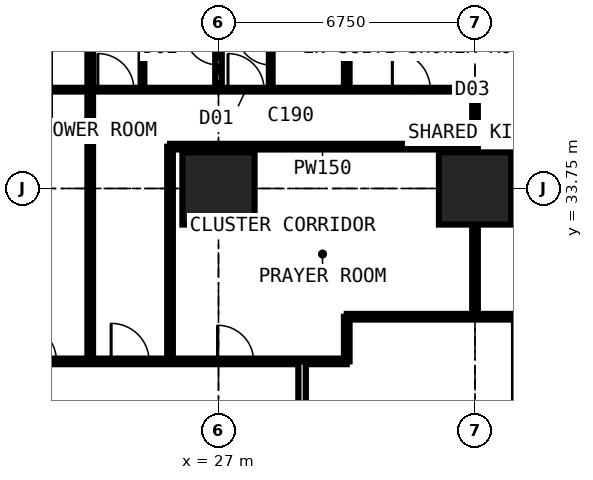
"""IFC4 building model, lengths in metres.
Left out: names, types, materials, properties, quantities, classifications, styles, units other than length and angle.
Written with IfcOpenShell. Run it as: python <this file> out.ifc"""

import sys

from ifc_helpers import new_model, si_unit, direction, frame, frame_2d, origin, origin_2d, place, context, subcontext, project, spatial, rectangle, extrude, element, fill, save


model = new_model("IFC4")
c1 = context("Model", 3, precision=1e-05, world=origin(), true_north=direction((0.0, 1.0)))
c2 = subcontext(c1, "Body", "Model", "MODEL_VIEW")
j1 = project(units=[si_unit("LENGTHUNIT", "METRE"), si_unit("PLANEANGLEUNIT", "RADIAN")], contexts=[c1])
p1 = place(None, origin())
s1 = spatial("IfcSite", under=j1, at=p1, CompositionType="ELEMENT")
p2 = place(p1, origin())
s2 = spatial("IfcBuilding", under=s1, at=p2, CompositionType="ELEMENT")
p3 = place(p2, frame((0.0, 0.0, 25.2)))
s3 = spatial("IfcBuildingStorey", under=s2, at=p3, CompositionType="ELEMENT", Elevation=25.2)
for number, where, z_axis, x_axis in (
    (1, (27.0, 33.75, 0.0), (0.0, 0.0, 1.0), (1.0, 0.0, 0.0)),
    (2, (33.75, 33.75, 0.0), (0.0, 0.0, 1.0), (1.0, 0.0, 0.0)),
):
    element("IfcColumn", number, at=place(p3, frame(where, z_axis=z_axis, x_axis=x_axis)), inside=s3, PredefinedType="COLUMN", context=c2, shape_type="SweptSolid", body=[
        extrude(rectangle(XDim=1.9, YDim=1.9, at=origin_2d()), origin(), (0.0, 0.0, 1.0), 3.6),
    ])
p4 = place(p3, frame((10.125, 36.35, 0.0), z_axis=(0.0, 0.0, 1.0), x_axis=(1.0, 0.0, 0.0)))
e3 = element("IfcWall", 3, at=p4, inside=s3, PredefinedType="PARTITIONING", context=c2, shape_type="SweptSolid", body=[
    extrude(rectangle(XDim=23.625, YDim=0.1, at=frame_2d((11.812, 0.0))), origin(), (0.0, 0.0, 1.0), 3.375),
])
p5 = place(p4, frame((21.45, 0.0, 0.0)))
e4 = element("IfcOpeningElement", 4, at=p5, cuts=e3, PredefinedType="OPENING", context=c2, shape_type="SweptSolid", body=[
    extrude(rectangle(XDim=1.0, YDim=2.2, at=frame_2d((0.5, 1.1))), frame((0.0, 0.06, 0.0), z_axis=(0.0, -1.0, 0.0), x_axis=(1.0, 0.0, 0.0)), (0.0, 0.0, 1.0), 0.12),
])
p6 = place(p4, frame((17.125, 0.0, 0.0)))
e5 = element("IfcOpeningElement", 5, at=p6, cuts=e3, PredefinedType="OPENING", context=c2, shape_type="SweptSolid", body=[
    extrude(rectangle(XDim=0.95, YDim=2.2, at=frame_2d((0.475, 1.1))), frame((0.0, 0.06, 0.0), z_axis=(0.0, -1.0, 0.0), x_axis=(1.0, 0.0, 0.0)), (0.0, 0.0, 1.0), 0.12),
])
p7 = place(p4, frame((13.7, 0.0, 0.0)))
e6 = element("IfcOpeningElement", 6, at=p7, cuts=e3, PredefinedType="OPENING", context=c2, shape_type="SweptSolid", body=[
    extrude(rectangle(XDim=0.95, YDim=2.2, at=frame_2d((0.475, 1.1))), frame((0.0, 0.06, 0.0), z_axis=(0.0, -1.0, 0.0), x_axis=(1.0, 0.0, 0.0)), (0.0, 0.0, 1.0), 0.12),
])
p8 = place(p4, frame((0.2, 0.0, 0.0)))
e7 = element("IfcOpeningElement", 7, at=p8, cuts=e3, PredefinedType="OPENING", context=c2, shape_type="SweptSolid", body=[
    extrude(rectangle(XDim=0.95, YDim=2.2, at=frame_2d((0.475, 1.1))), frame((0.0, 0.06, 0.0), z_axis=(0.0, -1.0, 0.0), x_axis=(1.0, 0.0, 0.0)), (0.0, 0.0, 1.0), 0.12),
])
p9 = place(p4, frame((3.625, 0.0, 0.0)))
e8 = element("IfcOpeningElement", 8, at=p9, cuts=e3, PredefinedType="OPENING", context=c2, shape_type="SweptSolid", body=[
    extrude(rectangle(XDim=0.95, YDim=2.2, at=frame_2d((0.475, 1.1))), frame((0.0, 0.06, 0.0), z_axis=(0.0, -1.0, 0.0), x_axis=(1.0, 0.0, 0.0)), (0.0, 0.0, 1.0), 0.12),
])
p10 = place(p4, frame((7.0, 0.0, 0.0)))
e9 = element("IfcOpeningElement", 9, at=p10, cuts=e3, PredefinedType="OPENING", context=c2, shape_type="SweptSolid", body=[
    extrude(rectangle(XDim=0.95, YDim=2.2, at=frame_2d((0.475, 1.1))), frame((0.0, 0.06, 0.0), z_axis=(0.0, -1.0, 0.0), x_axis=(1.0, 0.0, 0.0)), (0.0, 0.0, 1.0), 0.12),
])
p11 = place(p4, frame((10.375, 0.0, 0.0)))
e10 = element("IfcOpeningElement", 10, at=p11, cuts=e3, PredefinedType="OPENING", context=c2, shape_type="SweptSolid", body=[
    extrude(rectangle(XDim=0.95, YDim=2.2, at=frame_2d((0.475, 1.1))), frame((0.0, 0.06, 0.0), z_axis=(0.0, -1.0, 0.0), x_axis=(1.0, 0.0, 0.0)), (0.0, 0.0, 1.0), 0.12),
])
p12 = place(p3, frame((11.3, 29.2, 0.0), z_axis=(0.0, 0.0, 1.0), x_axis=(1.0, 0.0, 0.0)))
e11 = element("IfcWall", 11, at=p12, inside=s3, PredefinedType="PARTITIONING", context=c2, shape_type="SweptSolid", body=[
    extrude(rectangle(XDim=19.075, YDim=0.15, at=frame_2d((9.538, 0.0))), origin(), (0.0, 0.0, 1.0), 3.375),
])
p13 = place(p12, frame((12.875, 0.0, 0.0)))
e12 = element("IfcOpeningElement", 12, at=p13, cuts=e11, PredefinedType="OPENING", context=c2, shape_type="SweptSolid", body=[
    extrude(rectangle(XDim=1.0, YDim=2.2, at=frame_2d((0.5, 1.1))), frame((0.0, 0.085, 0.0), z_axis=(0.0, -1.0, 0.0), x_axis=(1.0, 0.0, 0.0)), (0.0, 0.0, 1.0), 0.17),
])
p14 = place(p12, frame((10.438, 0.0, 0.0)))
e13 = element("IfcOpeningElement", 13, at=p14, cuts=e11, PredefinedType="OPENING", context=c2, shape_type="SweptSolid", body=[
    extrude(rectangle(XDim=1.0, YDim=2.2, at=frame_2d((0.5, 1.1))), frame((0.0, 0.085, 0.0), z_axis=(0.0, -1.0, 0.0), x_axis=(1.0, 0.0, 0.0)), (0.0, 0.0, 1.0), 0.17),
])
p15 = place(p12, frame((15.675, 0.0, 0.0)))
e14 = element("IfcOpeningElement", 14, at=p15, cuts=e11, PredefinedType="OPENING", context=c2, shape_type="SweptSolid", body=[
    extrude(rectangle(XDim=0.95, YDim=2.2, at=frame_2d((0.475, 1.1))), frame((0.0, 0.085, 0.0), z_axis=(0.0, -1.0, 0.0), x_axis=(1.0, 0.0, 0.0)), (0.0, 0.0, 1.0), 0.17),
])
p16 = place(p3, frame((23.625, 29.2, 0.0), z_axis=(0.0, 0.0, 1.0), x_axis=(0.0, 1.0, 0.0)))
e15 = element("IfcWall", 15, at=p16, inside=s3, PredefinedType="PARTITIONING", context=c2, shape_type="SweptSolid", body=[
    extrude(rectangle(XDim=12.034, YDim=0.15, at=frame_2d((6.017, 0.0))), origin(), (0.0, 0.0, 1.0), 3.375),
])
p17 = place(p3, frame((25.0, 36.35, 0.0), z_axis=(0.0, 0.0, 1.0), x_axis=(0.0, 1.0, 0.0)))
e16 = element("IfcWall", 16, at=p17, inside=s3, PredefinedType="PARTITIONING", context=c2, shape_type="SweptSolid", body=[
    extrude(rectangle(XDim=2.2, YDim=0.1, at=frame_2d((1.1, 0.0))), origin(), (0.0, 0.0, 1.0), 3.375),
])
p18 = place(p3, frame((25.725, 29.2, 0.0), z_axis=(0.0, 0.0, 1.0), x_axis=(0.0, 1.0, 0.0)))
e17 = element("IfcWall", 17, at=p18, inside=s3, PredefinedType="PARTITIONING", context=c2, shape_type="SweptSolid", body=[
    extrude(rectangle(XDim=5.65, YDim=0.15, at=frame_2d((2.825, 0.0))), origin(), (0.0, 0.0, 1.0), 3.375),
])
p19 = place(p3, frame((25.725, 34.85, 0.0), z_axis=(0.0, 0.0, 1.0), x_axis=(1.0, 0.0, 0.0)))
e18 = element("IfcWall", 18, at=p19, inside=s3, PredefinedType="PARTITIONING", context=c2, shape_type="SweptSolid", body=[
    extrude(rectangle(XDim=8.025, YDim=0.15, at=frame_2d((4.012, 0.0))), origin(), (0.0, 0.0, 1.0), 3.375),
])
p20 = place(p3, frame((27.0, 36.35, 0.0), z_axis=(0.0, 0.0, 1.0), x_axis=(0.0, 1.0, 0.0)))
e19 = element("IfcWall", 19, at=p20, inside=s3, PredefinedType="PARTITIONING", context=c2, shape_type="SweptSolid", body=[
    extrude(rectangle(XDim=4.884, YDim=0.175, at=frame_2d((2.442, 0.0))), origin(), (0.0, 0.0, 1.0), 2.61),
])
p21 = place(p20, frame((0.65, 0.0, 0.0)))
e20 = element("IfcOpeningElement", 20, at=p21, cuts=e19, PredefinedType="OPENING", context=c2, shape_type="SweptSolid", body=[
    extrude(rectangle(XDim=0.9, YDim=2.2, at=frame_2d((0.45, 1.1))), frame((0.0, 0.097, 0.0), z_axis=(0.0, -1.0, 0.0), x_axis=(1.0, 0.0, 0.0)), (0.0, 0.0, 1.0), 0.195),
])
p22 = place(p3, frame((28.375, 36.35, 0.0), z_axis=(0.0, 0.0, 1.0), x_axis=(0.0, 1.0, 0.0)))
e21 = element("IfcWall", 21, at=p22, inside=s3, PredefinedType="PARTITIONING", context=c2, shape_type="SweptSolid", body=[
    extrude(rectangle(XDim=2.2, YDim=0.1, at=frame_2d((1.1, 0.0))), origin(), (0.0, 0.0, 1.0), 3.375),
])
p23 = place(p22, frame((0.65, 0.0, 0.0)))
e22 = element("IfcOpeningElement", 22, at=p23, cuts=e21, PredefinedType="OPENING", context=c2, shape_type="SweptSolid", body=[
    extrude(rectangle(XDim=0.9, YDim=2.2, at=frame_2d((0.45, 1.1))), frame((0.0, 0.06, 0.0), z_axis=(0.0, -1.0, 0.0), x_axis=(1.0, 0.0, 0.0)), (0.0, 0.0, 1.0), 0.12),
])
p24 = place(p3, frame((29.2, 11.3, 0.0), z_axis=(0.0, 0.0, 1.0), x_axis=(0.0, 1.0, 0.0)))
e23 = element("IfcWall", 23, at=p24, inside=s3, PredefinedType="PARTITIONING", context=c2, shape_type="SweptSolid", body=[
    extrude(rectangle(XDim=17.9, YDim=0.2, at=frame_2d((8.95, 0.0))), origin(), (0.0, 0.0, 1.0), 3.375),
])
p25 = place(p24, frame((8.35, 0.0, 0.0)))
e24 = element("IfcOpeningElement", 24, at=p25, cuts=e23, PredefinedType="OPENING", context=c2, shape_type="SweptSolid", body=[
    extrude(rectangle(XDim=1.2, YDim=2.2, at=frame_2d((0.6, 1.1))), frame((0.0, 0.11, 0.0), z_axis=(0.0, -1.0, 0.0), x_axis=(1.0, 0.0, 0.0)), (0.0, 0.0, 1.0), 0.22),
])
p26 = place(p3, frame((30.375, 29.2, 0.0), z_axis=(0.0, 0.0, 1.0), x_axis=(0.0, 1.0, 0.0)))
e25 = element("IfcWall", 25, at=p26, inside=s3, PredefinedType="PARTITIONING", context=c2, shape_type="SweptSolid", body=[
    extrude(rectangle(XDim=1.175, YDim=0.15, at=frame_2d((0.587, 0.0))), origin(), (0.0, 0.0, 1.0), 3.375),
])
p27 = place(p3, frame((30.375, 30.375, 0.0), z_axis=(0.0, 0.0, 1.0), x_axis=(1.0, 0.0, 0.0)))
e26 = element("IfcWall", 26, at=p27, inside=s3, PredefinedType="PARTITIONING", context=c2, shape_type="SweptSolid", body=[
    extrude(rectangle(XDim=10.859, YDim=0.15, at=frame_2d((5.429, 0.0))), origin(), (0.0, 0.0, 1.0), 3.375),
])
p28 = place(p3, frame((30.375, 36.35, 0.0), z_axis=(0.0, 0.0, 1.0), x_axis=(0.0, 1.0, 0.0)))
e27 = element("IfcWall", 27, at=p28, inside=s3, PredefinedType="PARTITIONING", context=c2, shape_type="SweptSolid", body=[
    extrude(rectangle(XDim=4.884, YDim=0.15, at=frame_2d((2.442, 0.0))), origin(), (0.0, 0.0, 1.0), 3.375),
])
p29 = place(p3, frame((33.75, 30.375, 0.0), z_axis=(0.0, 0.0, 1.0), x_axis=(0.0, 1.0, 0.0)))
e28 = element("IfcWall", 28, at=p29, inside=s3, PredefinedType="PARTITIONING", context=c2, shape_type="SweptSolid", body=[
    extrude(rectangle(XDim=5.975, YDim=0.15, at=frame_2d((2.988, 0.0))), origin(), (0.0, 0.0, 1.0), 2.877),
])
p30 = place(p5, origin())
e29 = element("IfcDoor", 29, at=p30, inside=s3, OperationType="SINGLE_SWING_LEFT", PredefinedType="DOOR", context=c2, shape_type="SweptSolid", body=[
    extrude(rectangle(XDim=1.0, YDim=2.2, at=frame_2d((0.5, 1.1))), frame((0.0, 0.025, 0.0), z_axis=(0.0, -1.0, 0.0), x_axis=(1.0, 0.0, 0.0)), (0.0, 0.0, 1.0), 0.05),
])
fill(e4, e29)
p31 = place(p6, origin())
e30 = element("IfcDoor", 30, at=p31, inside=s3, OperationType="SINGLE_SWING_LEFT", PredefinedType="DOOR", context=c2, shape_type="SweptSolid", body=[
    extrude(rectangle(XDim=0.95, YDim=2.2, at=frame_2d((0.475, 1.1))), frame((0.0, 0.025, 0.0), z_axis=(0.0, -1.0, 0.0), x_axis=(1.0, 0.0, 0.0)), (0.0, 0.0, 1.0), 0.05),
])
fill(e5, e30)
p32 = place(p23, origin())
e31 = element("IfcDoor", 31, at=p32, inside=s3, OperationType="SINGLE_SWING_RIGHT", PredefinedType="DOOR", context=c2, shape_type="SweptSolid", body=[
    extrude(rectangle(XDim=0.9, YDim=2.2, at=frame_2d((0.45, 1.1))), frame((0.0, 0.025, 0.0), z_axis=(0.0, -1.0, 0.0), x_axis=(1.0, 0.0, 0.0)), (0.0, 0.0, 1.0), 0.05),
])
fill(e22, e31)
p33 = place(p7, origin())
e32 = element("IfcDoor", 32, at=p33, inside=s3, OperationType="SINGLE_SWING_LEFT", PredefinedType="DOOR", context=c2, shape_type="SweptSolid", body=[
    extrude(rectangle(XDim=0.95, YDim=2.2, at=frame_2d((0.475, 1.1))), frame((0.0, 0.025, 0.0), z_axis=(0.0, -1.0, 0.0), x_axis=(1.0, 0.0, 0.0)), (0.0, 0.0, 1.0), 0.05),
])
fill(e6, e32)
p34 = place(p21, origin())
e33 = element("IfcDoor", 33, at=p34, inside=s3, OperationType="SINGLE_SWING_RIGHT", PredefinedType="DOOR", context=c2, shape_type="SweptSolid", body=[
    extrude(rectangle(XDim=0.9, YDim=2.2, at=frame_2d((0.45, 1.1))), frame((0.0, 0.025, 0.0), z_axis=(0.0, -1.0, 0.0), x_axis=(1.0, 0.0, 0.0)), (0.0, 0.0, 1.0), 0.05),
])
fill(e20, e33)
p35 = place(p13, origin())
e34 = element("IfcDoor", 34, at=p35, inside=s3, OperationType="SINGLE_SWING_LEFT", PredefinedType="DOOR", context=c2, shape_type="SweptSolid", body=[
    extrude(rectangle(XDim=1.0, YDim=2.2, at=frame_2d((0.5, 1.1))), frame((0.0, 0.025, 0.0), z_axis=(0.0, -1.0, 0.0), x_axis=(1.0, 0.0, 0.0)), (0.0, 0.0, 1.0), 0.05),
])
fill(e12, e34)
p36 = place(p14, origin())
e35 = element("IfcDoor", 35, at=p36, inside=s3, OperationType="SINGLE_SWING_LEFT", PredefinedType="DOOR", context=c2, shape_type="SweptSolid", body=[
    extrude(rectangle(XDim=1.0, YDim=2.2, at=frame_2d((0.5, 1.1))), frame((0.0, 0.025, 0.0), z_axis=(0.0, -1.0, 0.0), x_axis=(1.0, 0.0, 0.0)), (0.0, 0.0, 1.0), 0.05),
])
fill(e13, e35)
p37 = place(p15, origin())
e36 = element("IfcDoor", 36, at=p37, inside=s3, OperationType="SINGLE_SWING_LEFT", PredefinedType="DOOR", context=c2, shape_type="SweptSolid", body=[
    extrude(rectangle(XDim=0.95, YDim=2.2, at=frame_2d((0.475, 1.1))), frame((0.0, 0.025, 0.0), z_axis=(0.0, -1.0, 0.0), x_axis=(1.0, 0.0, 0.0)), (0.0, 0.0, 1.0), 0.05),
])
fill(e14, e36)
save(model, sys.argv[1])
